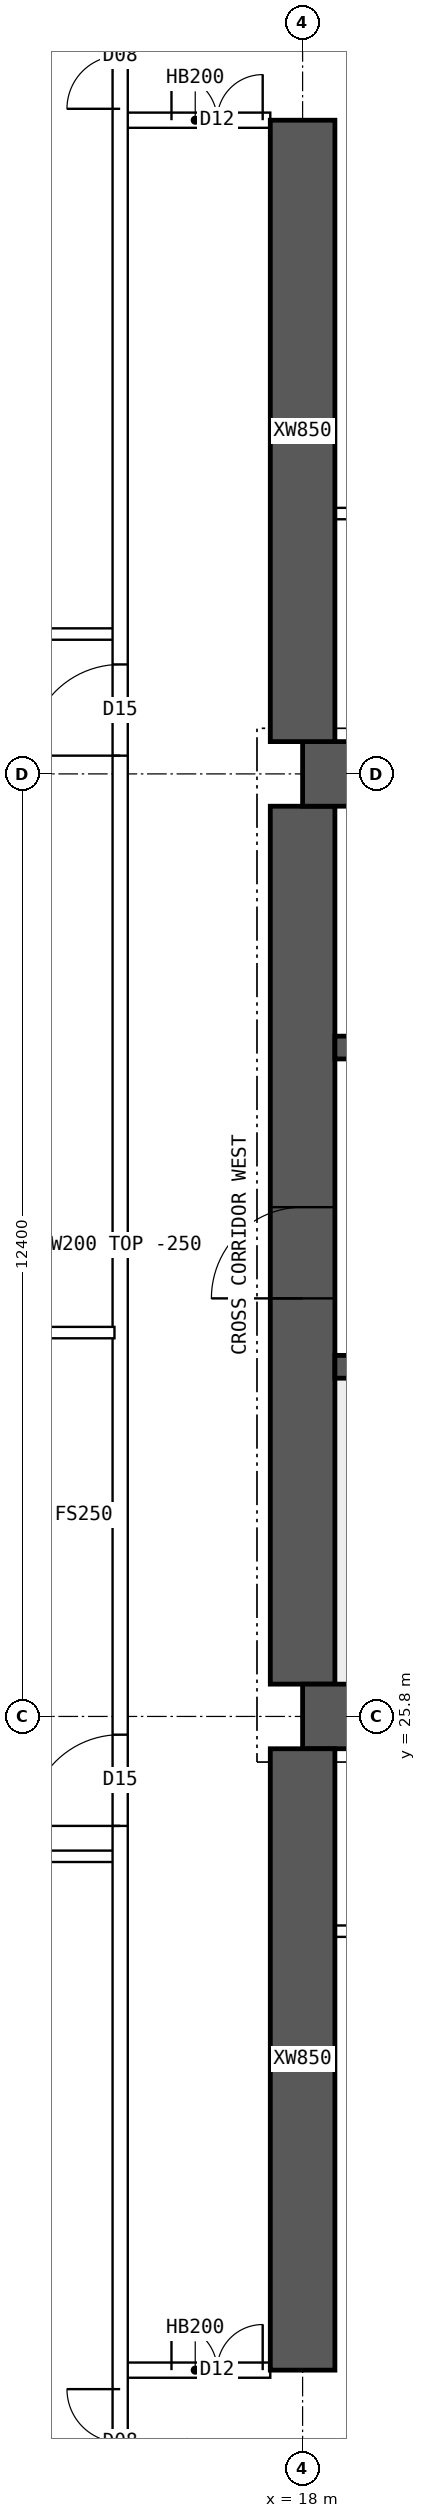
"""IFC4 building model, lengths in metres.
Left out: names, types, materials, properties, quantities, classifications, styles, units other than length and angle.
Written with IfcOpenShell. Run it as: python <this file> out.ifc"""

import sys

from ifc_helpers import new_model, si_unit, direction, frame, frame_2d, origin, place, context, subcontext, project, spatial, polyline, rectangle, outline, extrude, element, fill, save


model = new_model("IFC4")
c1 = context("Model", 3, precision=1e-05, world=origin(), true_north=direction((0.0, 1.0)))
c2 = subcontext(c1, "Body", "Model", "MODEL_VIEW")
j1 = project(units=[si_unit("LENGTHUNIT", "METRE"), si_unit("PLANEANGLEUNIT", "RADIAN")], contexts=[c1])
p1 = place(None, origin())
s1 = spatial("IfcSite", under=j1, at=p1, CompositionType="ELEMENT")
p2 = place(p1, origin())
s2 = spatial("IfcBuilding", under=s1, at=p2, CompositionType="ELEMENT")
p3 = place(p2, frame((0.0, 0.0, 171.1)))
s3 = spatial("IfcBuildingStorey", under=s2, at=p3, CompositionType="ELEMENT", Elevation=171.1)
for number, where, z_axis, x_axis in (
    (1, (18.0, 25.8, 0.0), (0.0, 0.0, 1.0), (1.0, 0.0, 0.0)),
    (2, (18.0, 38.2, 0.0), (0.0, 0.0, 1.0), (1.0, 0.0, 0.0)),
):
    element("IfcWall", number, at=place(p3, frame(where, z_axis=z_axis, x_axis=x_axis)), inside=s3, PredefinedType="SHEAR", context=c2, shape_type="SweptSolid", body=[
        extrude(rectangle(XDim=48.0, YDim=0.85, at=frame_2d((24.0, 0.0))), origin(), (0.0, 0.0, 1.0), 3.75),
    ])
p4 = place(p3, frame((18.0, 26.225, 0.0), z_axis=(0.0, 0.0, 1.0), x_axis=(0.0, 1.0, 0.0)))
e3 = element("IfcWall", 3, at=p4, inside=s3, PredefinedType="SHEAR", context=c2, shape_type="SweptSolid", body=[
    extrude(rectangle(XDim=11.55, YDim=0.85, at=frame_2d((5.775, 0.0))), origin(), (0.0, 0.0, 1.0), 3.75),
])
p5 = place(p4, frame((5.075, 0.0, 0.0)))
e4 = element("IfcOpeningElement", 4, at=p5, cuts=e3, PredefinedType="OPENING", context=c2, shape_type="SweptSolid", body=[
    extrude(rectangle(XDim=1.2, YDim=2.1, at=frame_2d((0.6, 1.05))), frame((0.0, 0.435, 0.0), z_axis=(0.0, -1.0, 0.0), x_axis=(1.0, 0.0, 0.0)), (0.0, 0.0, 1.0), 0.87),
])
p6 = place(p3, frame((18.425, 30.4, 0.0), z_axis=(0.0, 0.0, 1.0), x_axis=(1.0, 0.0, 0.0)))
e5 = element("IfcWall", 5, at=p6, inside=s3, PredefinedType="SHEAR", context=c2, shape_type="SweptSolid", body=[
    extrude(rectangle(XDim=47.15, YDim=0.3, at=frame_2d((23.575, 0.0))), origin(), (0.0, 0.0, 1.0), 3.75),
])
p7 = place(p6, frame((0.4, 0.0, 0.0)))
e6 = element("IfcOpeningElement", 6, at=p7, cuts=e5, PredefinedType="OPENING", context=c2, shape_type="SweptSolid", body=[
    extrude(rectangle(XDim=1.0, YDim=2.1, at=frame_2d((0.5, 1.05))), frame((0.0, 0.16, 0.0), z_axis=(0.0, -1.0, 0.0), x_axis=(1.0, 0.0, 0.0)), (0.0, 0.0, 1.0), 0.32),
])
p8 = place(p6, frame((45.75, 0.0, 0.0)))
e7 = element("IfcOpeningElement", 7, at=p8, cuts=e5, PredefinedType="OPENING", context=c2, shape_type="SweptSolid", body=[
    extrude(rectangle(XDim=1.0, YDim=2.1, at=frame_2d((0.5, 1.05))), frame((0.0, 0.16, 0.0), z_axis=(0.0, -1.0, 0.0), x_axis=(1.0, 0.0, 0.0)), (0.0, 0.0, 1.0), 0.32),
])
p9 = place(p6, frame((8.325, 0.0, 0.0)))
e8 = element("IfcOpeningElement", 8, at=p9, cuts=e5, PredefinedType="OPENING", context=c2, shape_type="SweptSolid", body=[
    extrude(rectangle(XDim=1.1, YDim=2.1, at=frame_2d((0.55, 1.05))), frame((0.0, 0.16, 0.0), z_axis=(0.0, -1.0, 0.0), x_axis=(1.0, 0.0, 0.0)), (0.0, 0.0, 1.0), 0.32),
])
p10 = place(p6, frame((10.925, 0.0, 0.0)))
e9 = element("IfcOpeningElement", 9, at=p10, cuts=e5, PredefinedType="OPENING", context=c2, shape_type="SweptSolid", body=[
    extrude(rectangle(XDim=1.1, YDim=2.1, at=frame_2d((0.55, 1.05))), frame((0.0, 0.16, 0.0), z_axis=(0.0, -1.0, 0.0), x_axis=(1.0, 0.0, 0.0)), (0.0, 0.0, 1.0), 0.32),
])
p11 = place(p6, frame((13.525, 0.0, 0.0)))
e10 = element("IfcOpeningElement", 10, at=p11, cuts=e5, PredefinedType="OPENING", context=c2, shape_type="SweptSolid", body=[
    extrude(rectangle(XDim=1.1, YDim=2.1, at=frame_2d((0.55, 1.05))), frame((0.0, 0.16, 0.0), z_axis=(0.0, -1.0, 0.0), x_axis=(1.0, 0.0, 0.0)), (0.0, 0.0, 1.0), 0.32),
])
p12 = place(p6, frame((16.125, 0.0, 0.0)))
e11 = element("IfcOpeningElement", 11, at=p12, cuts=e5, PredefinedType="OPENING", context=c2, shape_type="SweptSolid", body=[
    extrude(rectangle(XDim=1.1, YDim=2.1, at=frame_2d((0.55, 1.05))), frame((0.0, 0.16, 0.0), z_axis=(0.0, -1.0, 0.0), x_axis=(1.0, 0.0, 0.0)), (0.0, 0.0, 1.0), 0.32),
])
p13 = place(p6, frame((18.9, 0.0, 0.0)))
e12 = element("IfcOpeningElement", 12, at=p13, cuts=e5, PredefinedType="OPENING", context=c2, shape_type="SweptSolid", body=[
    extrude(rectangle(XDim=0.9, YDim=2.1, at=frame_2d((0.45, 1.05))), frame((0.0, 0.16, 0.0), z_axis=(0.0, -1.0, 0.0), x_axis=(1.0, 0.0, 0.0)), (0.0, 0.0, 1.0), 0.32),
])
p14 = place(p6, frame((30.192, 0.0, 0.0)))
e13 = element("IfcOpeningElement", 13, at=p14, cuts=e5, PredefinedType="OPENING", context=c2, shape_type="SweptSolid", body=[
    extrude(rectangle(XDim=1.1, YDim=2.1, at=frame_2d((0.55, 1.05))), frame((0.0, 0.16, 0.0), z_axis=(0.0, -1.0, 0.0), x_axis=(1.0, 0.0, 0.0)), (0.0, 0.0, 1.0), 0.32),
])
p15 = place(p6, frame((33.725, 0.0, 0.0)))
e14 = element("IfcOpeningElement", 14, at=p15, cuts=e5, PredefinedType="OPENING", context=c2, shape_type="SweptSolid", body=[
    extrude(rectangle(XDim=1.1, YDim=2.1, at=frame_2d((0.55, 1.05))), frame((0.0, 0.16, 0.0), z_axis=(0.0, -1.0, 0.0), x_axis=(1.0, 0.0, 0.0)), (0.0, 0.0, 1.0), 0.32),
])
p16 = place(p6, frame((37.258, 0.0, 0.0)))
e15 = element("IfcOpeningElement", 15, at=p16, cuts=e5, PredefinedType="OPENING", context=c2, shape_type="SweptSolid", body=[
    extrude(rectangle(XDim=1.1, YDim=2.1, at=frame_2d((0.55, 1.05))), frame((0.0, 0.16, 0.0), z_axis=(0.0, -1.0, 0.0), x_axis=(1.0, 0.0, 0.0)), (0.0, 0.0, 1.0), 0.32),
])
p17 = place(p3, frame((18.425, 34.6, 0.0), z_axis=(0.0, 0.0, 1.0), x_axis=(1.0, 0.0, 0.0)))
e16 = element("IfcWall", 16, at=p17, inside=s3, PredefinedType="SHEAR", context=c2, shape_type="SweptSolid", body=[
    extrude(rectangle(XDim=47.15, YDim=0.3, at=frame_2d((23.575, 0.0))), origin(), (0.0, 0.0, 1.0), 3.75),
])
p18 = place(p17, frame((0.9, 0.0, 0.0)))
e17 = element("IfcOpeningElement", 17, at=p18, cuts=e16, PredefinedType="OPENING", context=c2, shape_type="SweptSolid", body=[
    extrude(rectangle(XDim=1.1, YDim=2.1, at=frame_2d((0.55, 1.05))), frame((0.0, 0.16, 0.0), z_axis=(0.0, -1.0, 0.0), x_axis=(1.0, 0.0, 0.0)), (0.0, 0.0, 1.0), 0.32),
])
p19 = place(p17, frame((45.15, 0.0, 0.0)))
e18 = element("IfcOpeningElement", 18, at=p19, cuts=e16, PredefinedType="OPENING", context=c2, shape_type="SweptSolid", body=[
    extrude(rectangle(XDim=1.1, YDim=2.1, at=frame_2d((0.55, 1.05))), frame((0.0, 0.16, 0.0), z_axis=(0.0, -1.0, 0.0), x_axis=(1.0, 0.0, 0.0)), (0.0, 0.0, 1.0), 0.32),
])
p20 = place(p17, frame((4.175, 0.0, 0.0)))
e19 = element("IfcOpeningElement", 19, at=p20, cuts=e16, PredefinedType="OPENING", context=c2, shape_type="SweptSolid", body=[
    extrude(rectangle(XDim=0.9, YDim=2.1, at=frame_2d((0.45, 1.05))), frame((0.0, 0.16, 0.0), z_axis=(0.0, -1.0, 0.0), x_axis=(1.0, 0.0, 0.0)), (0.0, 0.0, 1.0), 0.32),
])
p21 = place(p17, frame((42.075, 0.0, 0.0)))
e20 = element("IfcOpeningElement", 20, at=p21, cuts=e16, PredefinedType="OPENING", context=c2, shape_type="SweptSolid", body=[
    extrude(rectangle(XDim=0.9, YDim=2.1, at=frame_2d((0.45, 1.05))), frame((0.0, 0.16, 0.0), z_axis=(0.0, -1.0, 0.0), x_axis=(1.0, 0.0, 0.0)), (0.0, 0.0, 1.0), 0.32),
])
p22 = place(p17, frame((8.95, 0.0, 0.0)))
e21 = element("IfcOpeningElement", 21, at=p22, cuts=e16, PredefinedType="OPENING", context=c2, shape_type="SweptSolid", body=[
    extrude(rectangle(XDim=0.9, YDim=2.1, at=frame_2d((0.45, 1.05))), frame((0.0, 0.16, 0.0), z_axis=(0.0, -1.0, 0.0), x_axis=(1.0, 0.0, 0.0)), (0.0, 0.0, 1.0), 0.32),
])
p23 = place(p17, frame((12.924, 0.0, 0.0)))
e22 = element("IfcOpeningElement", 22, at=p23, cuts=e16, PredefinedType="OPENING", context=c2, shape_type="SweptSolid", body=[
    extrude(rectangle(XDim=0.9, YDim=2.1, at=frame_2d((0.45, 1.05))), frame((0.0, 0.16, 0.0), z_axis=(0.0, -1.0, 0.0), x_axis=(1.0, 0.0, 0.0)), (0.0, 0.0, 1.0), 0.32),
])
p24 = place(p17, frame((16.571, 0.0, 0.0)))
e23 = element("IfcOpeningElement", 23, at=p24, cuts=e16, PredefinedType="OPENING", context=c2, shape_type="SweptSolid", body=[
    extrude(rectangle(XDim=0.9, YDim=2.1, at=frame_2d((0.45, 1.05))), frame((0.0, 0.16, 0.0), z_axis=(0.0, -1.0, 0.0), x_axis=(1.0, 0.0, 0.0)), (0.0, 0.0, 1.0), 0.32),
])
p25 = place(p17, frame((20.33, 0.0, 0.0)))
e24 = element("IfcOpeningElement", 24, at=p25, cuts=e16, PredefinedType="OPENING", context=c2, shape_type="SweptSolid", body=[
    extrude(rectangle(XDim=0.9, YDim=2.1, at=frame_2d((0.45, 1.05))), frame((0.0, 0.16, 0.0), z_axis=(0.0, -1.0, 0.0), x_axis=(1.0, 0.0, 0.0)), (0.0, 0.0, 1.0), 0.32),
])
p26 = place(p17, frame((24.736, 0.0, 0.0)))
e25 = element("IfcOpeningElement", 25, at=p26, cuts=e16, PredefinedType="OPENING", context=c2, shape_type="SweptSolid", body=[
    extrude(rectangle(XDim=0.9, YDim=2.1, at=frame_2d((0.45, 1.05))), frame((0.0, 0.16, 0.0), z_axis=(0.0, -1.0, 0.0), x_axis=(1.0, 0.0, 0.0)), (0.0, 0.0, 1.0), 0.32),
])
p27 = place(p17, frame((27.533, 0.0, 0.0)))
e26 = element("IfcOpeningElement", 26, at=p27, cuts=e16, PredefinedType="OPENING", context=c2, shape_type="SweptSolid", body=[
    extrude(rectangle(XDim=0.9, YDim=2.1, at=frame_2d((0.45, 1.05))), frame((0.0, 0.16, 0.0), z_axis=(0.0, -1.0, 0.0), x_axis=(1.0, 0.0, 0.0)), (0.0, 0.0, 1.0), 0.32),
])
p28 = place(p17, frame((29.5, 0.0, 0.0)))
e27 = element("IfcOpeningElement", 27, at=p28, cuts=e16, PredefinedType="OPENING", context=c2, shape_type="SweptSolid", body=[
    extrude(rectangle(XDim=0.9, YDim=2.1, at=frame_2d((0.45, 1.05))), frame((0.0, 0.16, 0.0), z_axis=(0.0, -1.0, 0.0), x_axis=(1.0, 0.0, 0.0)), (0.0, 0.0, 1.0), 0.32),
])
p29 = place(p17, frame((31.932, 0.0, 0.0)))
e28 = element("IfcOpeningElement", 28, at=p29, cuts=e16, PredefinedType="OPENING", context=c2, shape_type="SweptSolid", body=[
    extrude(rectangle(XDim=0.9, YDim=2.1, at=frame_2d((0.45, 1.05))), frame((0.0, 0.16, 0.0), z_axis=(0.0, -1.0, 0.0), x_axis=(1.0, 0.0, 0.0)), (0.0, 0.0, 1.0), 0.32),
])
p30 = place(p17, frame((34.667, 0.0, 0.0)))
e29 = element("IfcOpeningElement", 29, at=p30, cuts=e16, PredefinedType="OPENING", context=c2, shape_type="SweptSolid", body=[
    extrude(rectangle(XDim=0.9, YDim=2.1, at=frame_2d((0.45, 1.05))), frame((0.0, 0.16, 0.0), z_axis=(0.0, -1.0, 0.0), x_axis=(1.0, 0.0, 0.0)), (0.0, 0.0, 1.0), 0.32),
])
p31 = place(p17, frame((37.707, 0.0, 0.0)))
e30 = element("IfcOpeningElement", 30, at=p31, cuts=e16, PredefinedType="OPENING", context=c2, shape_type="SweptSolid", body=[
    extrude(rectangle(XDim=0.9, YDim=2.1, at=frame_2d((0.45, 1.05))), frame((0.0, 0.16, 0.0), z_axis=(0.0, -1.0, 0.0), x_axis=(1.0, 0.0, 0.0)), (0.0, 0.0, 1.0), 0.32),
])
for number, where, z_axis, x_axis in (
    (31, (18.0, 17.2, 0.0), (0.0, 0.0, 1.0), (0.0, 1.0, 0.0)),
    (32, (18.0, 38.625, 0.0), (0.0, 0.0, 1.0), (0.0, 1.0, 0.0)),
):
    element("IfcWall", number, at=place(p3, frame(where, z_axis=z_axis, x_axis=x_axis)), inside=s3, PredefinedType="SHEAR", context=c2, shape_type="SweptSolid", body=[
        extrude(rectangle(XDim=8.175, YDim=0.85, at=frame_2d((4.087, 0.0))), origin(), (0.0, 0.0, 1.0), 3.75),
    ])
p32 = place(p3, frame((15.6, 17.2, 0.0), z_axis=(0.0, 0.0, 1.0), x_axis=(1.0, 0.0, 0.0)))
e33 = element("IfcWall", 33, at=p32, inside=s3, PredefinedType="SOLIDWALL", context=c2, shape_type="SweptSolid", body=[
    extrude(rectangle(XDim=1.975, YDim=0.2, at=frame_2d((0.987, 0.0))), origin(), (0.0, 0.0, 1.0), 3.5),
])
p33 = place(p32, frame((0.675, 0.0, 0.0)))
e34 = element("IfcOpeningElement", 34, at=p33, cuts=e33, PredefinedType="OPENING", context=c2, shape_type="SweptSolid", body=[
    extrude(rectangle(XDim=1.2, YDim=2.1, at=frame_2d((0.6, 1.05))), frame((0.0, 0.11, 0.0), z_axis=(0.0, -1.0, 0.0), x_axis=(1.0, 0.0, 0.0)), (0.0, 0.0, 1.0), 0.22),
])
p34 = place(p3, frame((15.6, 46.8, 0.0), z_axis=(0.0, 0.0, 1.0), x_axis=(1.0, 0.0, 0.0)))
e35 = element("IfcWall", 35, at=p34, inside=s3, PredefinedType="SOLIDWALL", context=c2, shape_type="SweptSolid", body=[
    extrude(rectangle(XDim=1.975, YDim=0.2, at=frame_2d((0.987, 0.0))), origin(), (0.0, 0.0, 1.0), 3.5),
])
p35 = place(p34, frame((0.675, 0.0, 0.0)))
e36 = element("IfcOpeningElement", 36, at=p35, cuts=e35, PredefinedType="OPENING", context=c2, shape_type="SweptSolid", body=[
    extrude(rectangle(XDim=1.2, YDim=2.1, at=frame_2d((0.6, 1.05))), frame((0.0, 0.11, 0.0), z_axis=(0.0, -1.0, 0.0), x_axis=(1.0, 0.0, 0.0)), (0.0, 0.0, 1.0), 0.22),
])
p36 = place(p3, frame((18.425, 22.975, 0.0), z_axis=(0.0, 0.0, 1.0), x_axis=(1.0, 0.0, 0.0)))
e37 = element("IfcWall", 37, at=p36, inside=s3, PredefinedType="PARTITIONING", context=c2, shape_type="SweptSolid", body=[
    extrude(rectangle(XDim=5.5, YDim=0.15, at=frame_2d((2.75, 0.0))), origin(), (0.0, 0.0, 1.0), 3.5),
])
p37 = place(p36, frame((0.4, 0.0, 0.0)))
e38 = element("IfcOpeningElement", 38, at=p37, cuts=e37, PredefinedType="OPENING", context=c2, shape_type="SweptSolid", body=[
    extrude(rectangle(XDim=1.0, YDim=2.1, at=frame_2d((0.5, 1.05))), frame((0.0, 0.085, 0.0), z_axis=(0.0, -1.0, 0.0), x_axis=(1.0, 0.0, 0.0)), (0.0, 0.0, 1.0), 0.17),
])
p38 = place(p3, frame((23.925, 41.625, 0.0), z_axis=(0.0, 0.0, 1.0), x_axis=(-1.0, 0.0, 0.0)))
e39 = element("IfcWall", 39, at=p38, inside=s3, PredefinedType="PARTITIONING", context=c2, shape_type="SweptSolid", body=[
    extrude(rectangle(XDim=5.5, YDim=0.15, at=frame_2d((2.75, 0.0))), origin(), (0.0, 0.0, 1.0), 3.5),
])
p39 = place(p38, frame((0.4, 0.0, 0.0)))
e40 = element("IfcOpeningElement", 40, at=p39, cuts=e39, PredefinedType="OPENING", context=c2, shape_type="SweptSolid", body=[
    extrude(rectangle(XDim=1.0, YDim=2.1, at=frame_2d((0.5, 1.05))), frame((0.0, 0.085, 0.0), z_axis=(0.0, -1.0, 0.0), x_axis=(1.0, 0.0, 0.0)), (0.0, 0.0, 1.0), 0.17),
])
p40 = place(p3, frame((8.705, 30.85, 0.0), z_axis=(0.0, 0.0, 1.0), x_axis=(1.0, 0.0, 0.0)))
e41 = element("IfcWall", 41, at=p40, inside=s3, PredefinedType="PARTITIONING", context=c2, shape_type="SweptSolid", body=[
    extrude(outline(polyline([(0.0, 0.0), (6.82, 0.0), (6.82, 3.5), (3.597, 3.5), (3.595, 3.05), (2.997, 3.05), (2.995, 3.5), (0.0, 3.5), (0.0, 0.0)])), frame((0.0, 0.075, 0.0), z_axis=(0.0, -1.0, 0.0), x_axis=(1.0, 0.0, 0.0)), (0.0, 0.0, 1.0), 0.15),
])
p41 = place(p3, frame((15.6, 10.446, 0.0), z_axis=(0.0, 0.0, 1.0), x_axis=(0.0, 1.0, 0.0)))
e42 = element("IfcWall", 42, at=p41, inside=s3, PredefinedType="SOLIDWALL", context=c2, shape_type="SweptSolid", body=[
    extrude(rectangle(XDim=43.107, YDim=0.2, at=frame_2d((21.554, 0.0))), origin(), (0.0, 0.0, 1.0), 3.5),
])
p42 = place(p41, frame((13.914, 0.0, 0.0)))
e43 = element("IfcOpeningElement", 43, at=p42, cuts=e42, PredefinedType="OPENING", context=c2, shape_type="SweptSolid", body=[
    extrude(rectangle(XDim=1.2, YDim=2.1, at=frame_2d((0.6, 1.05))), frame((0.0, 0.11, 0.0), z_axis=(0.0, -1.0, 0.0), x_axis=(1.0, 0.0, 0.0)), (0.0, 0.0, 1.0), 0.22),
])
p43 = place(p41, frame((27.994, 0.0, 0.0)))
e44 = element("IfcOpeningElement", 44, at=p43, cuts=e42, PredefinedType="OPENING", context=c2, shape_type="SweptSolid", body=[
    extrude(rectangle(XDim=1.2, YDim=2.1, at=frame_2d((0.6, 1.05))), frame((0.0, 0.11, 0.0), z_axis=(0.0, -1.0, 0.0), x_axis=(1.0, 0.0, 0.0)), (0.0, 0.0, 1.0), 0.22),
])
p44 = place(p41, frame((5.104, 0.0, 0.0)))
e45 = element("IfcOpeningElement", 45, at=p44, cuts=e42, PredefinedType="OPENING", context=c2, shape_type="SweptSolid", body=[
    extrude(rectangle(XDim=1.4, YDim=2.1, at=frame_2d((0.7, 1.05))), frame((0.0, 0.11, 0.0), z_axis=(0.0, -1.0, 0.0), x_axis=(1.0, 0.0, 0.0)), (0.0, 0.0, 1.0), 0.22),
])
p45 = place(p41, frame((36.504, 0.0, 0.0)))
e46 = element("IfcOpeningElement", 46, at=p45, cuts=e42, PredefinedType="OPENING", context=c2, shape_type="SweptSolid", body=[
    extrude(rectangle(XDim=1.4, YDim=2.1, at=frame_2d((0.7, 1.05))), frame((0.0, 0.11, 0.0), z_axis=(0.0, -1.0, 0.0), x_axis=(1.0, 0.0, 0.0)), (0.0, 0.0, 1.0), 0.22),
])
for number, where, z_axis, x_axis in (
    (47, (8.705, 23.96, 0.0), (0.0, 0.0, 1.0), (1.0, 0.0, 0.0)),
    (48, (8.705, 40.04, 0.0), (0.0, 0.0, 1.0), (1.0, 0.0, 0.0)),
):
    element("IfcWall", number, at=place(p3, frame(where, z_axis=z_axis, x_axis=x_axis)), inside=s3, PredefinedType="PARTITIONING", context=c2, shape_type="SweptSolid", body=[
        extrude(rectangle(XDim=6.82, YDim=0.15, at=frame_2d((3.41, 0.0))), origin(), (0.0, 0.0, 1.0), 3.5),
    ])
p46 = place(p5, origin())
e49 = element("IfcDoor", 49, at=p46, inside=s3, OperationType="SINGLE_SWING_LEFT", PredefinedType="DOOR", context=c2, shape_type="SweptSolid", body=[
    extrude(rectangle(XDim=1.2, YDim=2.1, at=frame_2d((0.6, 1.05))), frame((0.0, 0.025, 0.0), z_axis=(0.0, -1.0, 0.0), x_axis=(1.0, 0.0, 0.0)), (0.0, 0.0, 1.0), 0.05),
])
fill(e4, e49)
p47 = place(p33, origin())
e50 = element("IfcDoor", 50, at=p47, inside=s3, OperationType="DOUBLE_DOOR_SINGLE_SWING", PredefinedType="DOOR", context=c2, shape_type="SweptSolid", body=[
    extrude(rectangle(XDim=1.2, YDim=2.1, at=frame_2d((0.6, 1.05))), frame((0.0, 0.025, 0.0), z_axis=(0.0, -1.0, 0.0), x_axis=(1.0, 0.0, 0.0)), (0.0, 0.0, 1.0), 0.05),
])
fill(e34, e50)
p48 = place(p35, origin())
e51 = element("IfcDoor", 51, at=p48, inside=s3, OperationType="DOUBLE_DOOR_SINGLE_SWING", PredefinedType="DOOR", context=c2, shape_type="SweptSolid", body=[
    extrude(rectangle(XDim=1.2, YDim=2.1, at=frame_2d((0.6, 1.05))), frame((0.0, 0.025, 0.0), z_axis=(0.0, -1.0, 0.0), x_axis=(1.0, 0.0, 0.0)), (0.0, 0.0, 1.0), 0.05),
])
fill(e36, e51)
p49 = place(p42, origin())
e52 = element("IfcDoor", 52, at=p49, inside=s3, OperationType="SINGLE_SWING_LEFT", PredefinedType="DOOR", context=c2, shape_type="SweptSolid", body=[
    extrude(rectangle(XDim=1.2, YDim=2.1, at=frame_2d((0.6, 1.05))), frame((0.0, 0.025, 0.0), z_axis=(0.0, -1.0, 0.0), x_axis=(1.0, 0.0, 0.0)), (0.0, 0.0, 1.0), 0.05),
])
fill(e43, e52)
p50 = place(p43, origin())
e53 = element("IfcDoor", 53, at=p50, inside=s3, OperationType="SINGLE_SWING_LEFT", PredefinedType="DOOR", context=c2, shape_type="SweptSolid", body=[
    extrude(rectangle(XDim=1.2, YDim=2.1, at=frame_2d((0.6, 1.05))), frame((0.0, 0.025, 0.0), z_axis=(0.0, -1.0, 0.0), x_axis=(1.0, 0.0, 0.0)), (0.0, 0.0, 1.0), 0.05),
])
fill(e44, e53)
p51 = place(p44, origin())
e54 = element("IfcDoor", 54, at=p51, inside=s3, OperationType="DOUBLE_DOOR_SINGLE_SWING", PredefinedType="DOOR", context=c2, shape_type="SweptSolid", body=[
    extrude(rectangle(XDim=1.4, YDim=2.1, at=frame_2d((0.7, 1.05))), frame((0.0, 0.025, 0.0), z_axis=(0.0, -1.0, 0.0), x_axis=(1.0, 0.0, 0.0)), (0.0, 0.0, 1.0), 0.05),
])
fill(e45, e54)
p52 = place(p45, origin())
e55 = element("IfcDoor", 55, at=p52, inside=s3, OperationType="DOUBLE_DOOR_SINGLE_SWING", PredefinedType="DOOR", context=c2, shape_type="SweptSolid", body=[
    extrude(rectangle(XDim=1.4, YDim=2.1, at=frame_2d((0.7, 1.05))), frame((0.0, 0.025, 0.0), z_axis=(0.0, -1.0, 0.0), x_axis=(1.0, 0.0, 0.0)), (0.0, 0.0, 1.0), 0.05),
])
fill(e46, e55)
save(model, sys.argv[1])
